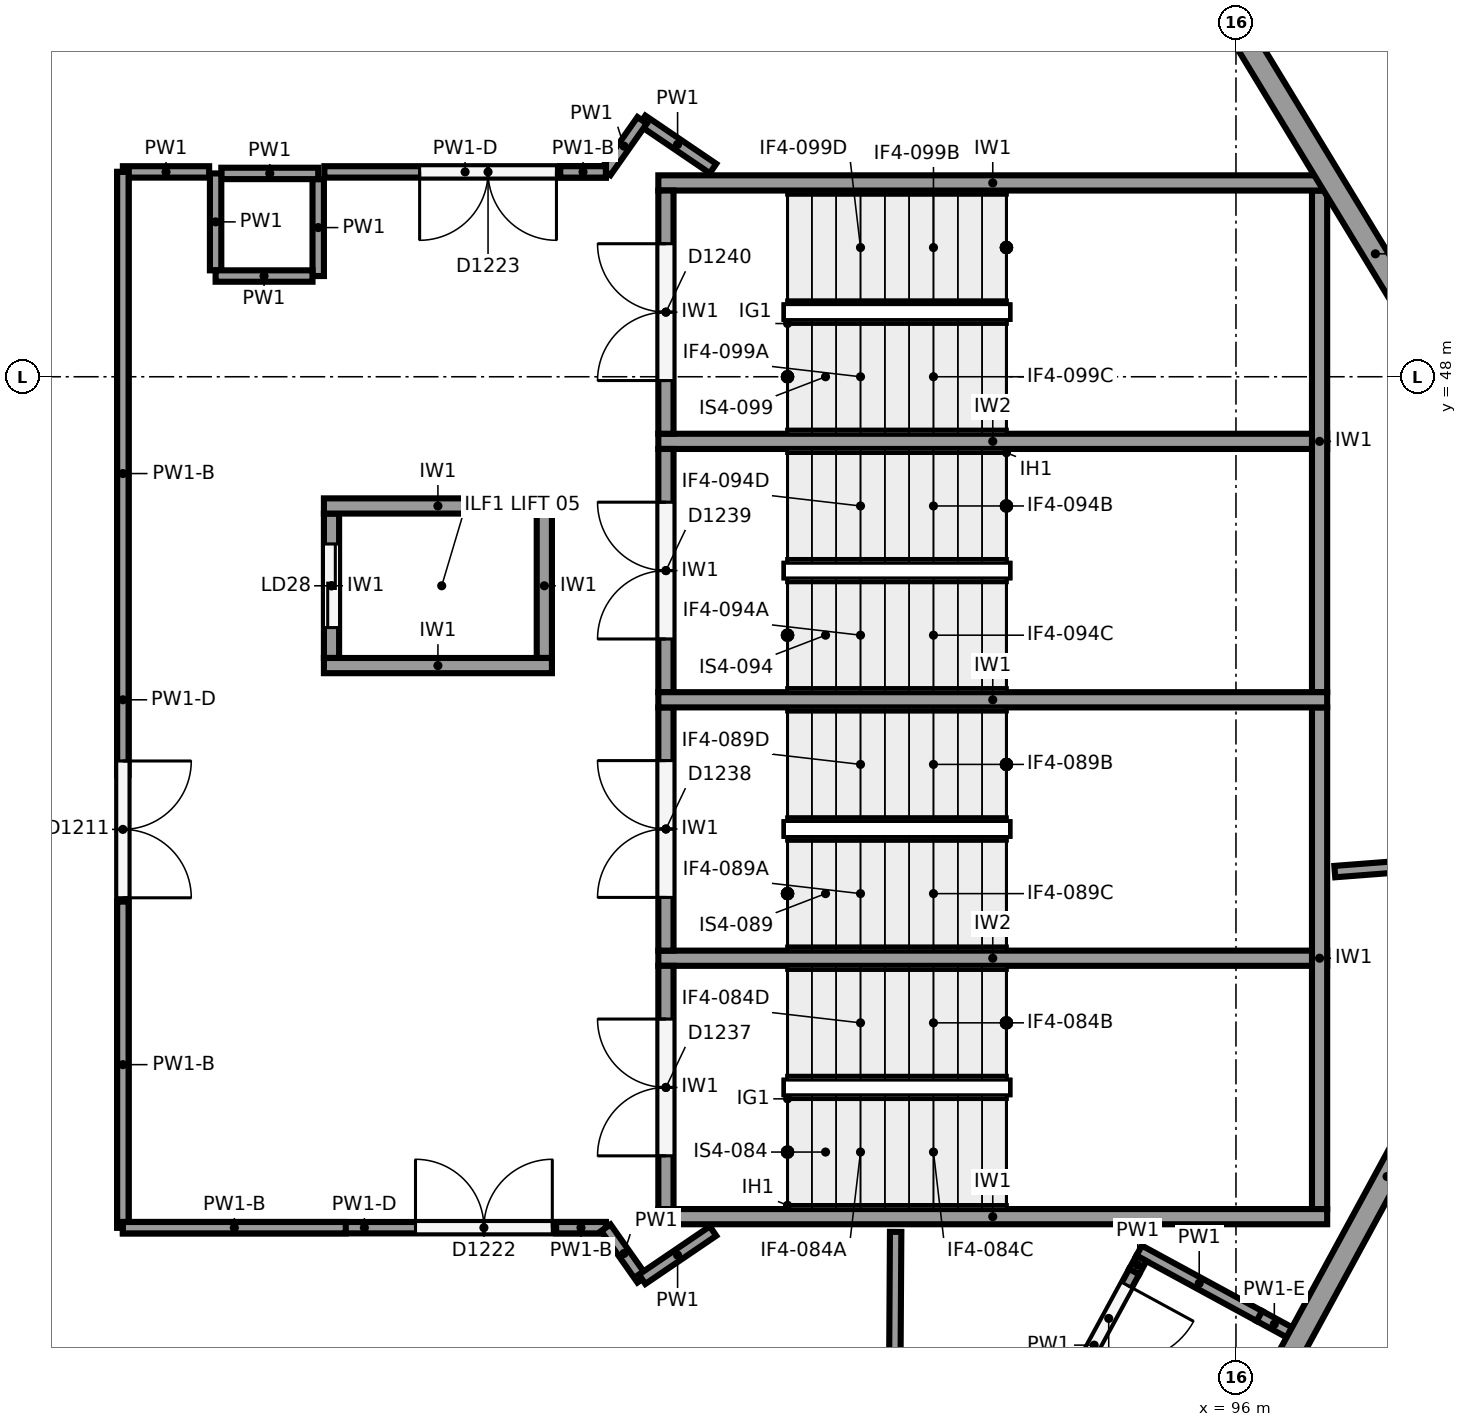
"""IFC4 building model, lengths in metres.
Left out: names, types, materials, properties, quantities, classifications, styles, units other than length and angle.
Written with IfcOpenShell. Run it as: python <this file> out.ifc"""

import sys

from ifc_helpers import new_model, si_unit, direction, frame, frame_2d, origin, origin_2d, place, context, subcontext, project, spatial, rectangle, circle, extrude, element, fill, save


model = new_model("IFC4")
c1 = context("Model", 3, precision=1e-05, world=origin(), true_north=direction((0.0, 1.0)))
c2 = subcontext(c1, "Body", "Model", "MODEL_VIEW")
j1 = project(units=[si_unit("LENGTHUNIT", "METRE"), si_unit("PLANEANGLEUNIT", "RADIAN")], contexts=[c1])
p1 = place(None, origin())
s1 = spatial("IfcSite", under=j1, at=p1, CompositionType="ELEMENT")
p2 = place(p1, origin())
s2 = spatial("IfcBuilding", under=s1, at=p2, CompositionType="ELEMENT")
p3 = place(p2, frame((0.0, 0.0, 12.0)))
s3 = spatial("IfcBuildingStorey", under=s2, at=p3, CompositionType="ELEMENT", Elevation=12.0)
p4 = place(p3, frame((84.884, 42.562, 0.0), z_axis=(0.0, 0.0, 1.0), x_axis=(1.0, 0.0, 0.0)))
e1 = element("IfcColumn", 1, at=p4, inside=s3, PredefinedType="COLUMN", context=c2, shape_type="SweptSolid", body=[
    extrude(circle(Radius=0.6, at=origin_2d()), origin(), (0.0, 0.0, 1.0), 6.0),
])
p5 = place(p3, frame((101.161, 43.311, 0.0), z_axis=(0.0, 0.0, 1.0), x_axis=(-0.477867771117, -0.878431780691, 0.0)))
e2 = element("IfcWall", 2, at=p5, inside=s3, PredefinedType="SOLIDWALL", context=c2, shape_type="SweptSolid", body=[
    extrude(rectangle(XDim=13.28, YDim=0.3, at=frame_2d((6.64, 0.0))), origin(), (0.0, 0.0, 1.0), 4.35),
])
p6 = place(p5, frame((9.53, 0.0, 0.0)))
e3 = element("IfcOpeningElement", 3, at=p6, cuts=e2, PredefinedType="OPENING", context=c2, shape_type="SweptSolid", body=[
    extrude(rectangle(XDim=1.8, YDim=2.4, at=frame_2d((0.9, 1.2))), frame((0.0, 0.16, 0.0), z_axis=(0.0, -1.0, 0.0), x_axis=(1.0, 0.0, 0.0)), (0.0, 0.0, 1.0), 0.32),
])
p7 = place(p3, frame((94.528, 55.057, 0.0), z_axis=(0.0, 0.0, 1.0), x_axis=(0.519362860044, -0.854553813172, 0.0)))
e4 = element("IfcWall", 4, at=p7, inside=s3, PredefinedType="SOLIDWALL", context=c2, shape_type="SweptSolid", body=[
    extrude(rectangle(XDim=12.732, YDim=0.3, at=frame_2d((6.366, 0.0))), origin(), (0.0, 0.0, 1.0), 4.35),
])
for number, where, z_axis, x_axis in (
    (5, (97.2, 36.95, 0.0), (0.0, 0.0, 1.0), (-1.0, 0.0, 0.0)),
    (6, (97.2, 43.75, 0.0), (0.0, 0.0, 1.0), (-1.0, 0.0, 0.0)),
    (7, (97.2, 50.55, 0.0), (0.0, 0.0, 1.0), (-1.0, 0.0, 0.0)),
):
    element("IfcWall", number, at=place(p3, frame(where, z_axis=z_axis, x_axis=x_axis)), inside=s3, PredefinedType="SHEAR", context=c2, shape_type="SweptSolid", body=[
        extrude(rectangle(XDim=8.8, YDim=0.2, at=frame_2d((4.4, 0.0))), origin(), (0.0, 0.0, 1.0), 5.65),
    ])
for number, where, z_axis, x_axis in (
    (8, (97.1, 37.05, 0.0), (0.0, 0.0, 1.0), (0.0, 1.0, 0.0)),
    (9, (97.1, 43.85, 0.0), (0.0, 0.0, 1.0), (0.0, 1.0, 0.0)),
):
    element("IfcWall", number, at=place(p3, frame(where, z_axis=z_axis, x_axis=x_axis)), inside=s3, PredefinedType="SHEAR", context=c2, shape_type="SweptSolid", body=[
        extrude(rectangle(XDim=6.6, YDim=0.2, at=frame_2d((3.3, 0.0))), origin(), (0.0, 0.0, 1.0), 5.65),
    ])
for number, where, z_axis, x_axis in (
    (10, (97.2, 40.35, 0.0), (0.0, 0.0, 1.0), (-1.0, 0.0, 0.0)),
    (11, (97.2, 47.15, 0.0), (0.0, 0.0, 1.0), (-1.0, 0.0, 0.0)),
):
    element("IfcWall", number, at=place(p3, frame(where, z_axis=z_axis, x_axis=x_axis)), inside=s3, PredefinedType="SHEAR", context=c2, shape_type="SweptSolid", body=[
        extrude(rectangle(XDim=8.8, YDim=0.2, at=frame_2d((4.4, 0.0))), origin(), (0.0, 0.0, 1.0), 5.65),
    ])
p8 = place(p3, frame((88.5, 37.05, 0.0), z_axis=(0.0, 0.0, 1.0), x_axis=(0.0, 1.0, 0.0)))
e12 = element("IfcWall", 12, at=p8, inside=s3, PredefinedType="SHEAR", context=c2, shape_type="SweptSolid", body=[
    extrude(rectangle(XDim=3.2, YDim=0.2, at=frame_2d((1.6, 0.0))), origin(), (0.0, 0.0, 1.0), 5.65),
])
p9 = place(p8, frame((0.7, 0.0, 0.0)))
e13 = element("IfcOpeningElement", 13, at=p9, cuts=e12, PredefinedType="OPENING", context=c2, shape_type="SweptSolid", body=[
    extrude(rectangle(XDim=1.8, YDim=2.1, at=frame_2d((0.9, 1.05))), frame((0.0, 0.11, 0.0), z_axis=(0.0, -1.0, 0.0), x_axis=(1.0, 0.0, 0.0)), (0.0, 0.0, 1.0), 0.22),
])
p10 = place(p3, frame((88.5, 40.45, 0.0), z_axis=(0.0, 0.0, 1.0), x_axis=(0.0, 1.0, 0.0)))
e14 = element("IfcWall", 14, at=p10, inside=s3, PredefinedType="SHEAR", context=c2, shape_type="SweptSolid", body=[
    extrude(rectangle(XDim=3.2, YDim=0.2, at=frame_2d((1.6, 0.0))), origin(), (0.0, 0.0, 1.0), 5.65),
])
p11 = place(p10, frame((0.7, 0.0, 0.0)))
e15 = element("IfcOpeningElement", 15, at=p11, cuts=e14, PredefinedType="OPENING", context=c2, shape_type="SweptSolid", body=[
    extrude(rectangle(XDim=1.8, YDim=2.1, at=frame_2d((0.9, 1.05))), frame((0.0, 0.11, 0.0), z_axis=(0.0, -1.0, 0.0), x_axis=(1.0, 0.0, 0.0)), (0.0, 0.0, 1.0), 0.22),
])
p12 = place(p3, frame((88.5, 43.85, 0.0), z_axis=(0.0, 0.0, 1.0), x_axis=(0.0, 1.0, 0.0)))
e16 = element("IfcWall", 16, at=p12, inside=s3, PredefinedType="SHEAR", context=c2, shape_type="SweptSolid", body=[
    extrude(rectangle(XDim=3.2, YDim=0.2, at=frame_2d((1.6, 0.0))), origin(), (0.0, 0.0, 1.0), 5.65),
])
p13 = place(p12, frame((0.7, 0.0, 0.0)))
e17 = element("IfcOpeningElement", 17, at=p13, cuts=e16, PredefinedType="OPENING", context=c2, shape_type="SweptSolid", body=[
    extrude(rectangle(XDim=1.8, YDim=2.1, at=frame_2d((0.9, 1.05))), frame((0.0, 0.11, 0.0), z_axis=(0.0, -1.0, 0.0), x_axis=(1.0, 0.0, 0.0)), (0.0, 0.0, 1.0), 0.22),
])
p14 = place(p3, frame((88.5, 47.25, 0.0), z_axis=(0.0, 0.0, 1.0), x_axis=(0.0, 1.0, 0.0)))
e18 = element("IfcWall", 18, at=p14, inside=s3, PredefinedType="SHEAR", context=c2, shape_type="SweptSolid", body=[
    extrude(rectangle(XDim=3.2, YDim=0.2, at=frame_2d((1.6, 0.0))), origin(), (0.0, 0.0, 1.0), 5.65),
])
p15 = place(p14, frame((0.7, 0.0, 0.0)))
e19 = element("IfcOpeningElement", 19, at=p15, cuts=e18, PredefinedType="OPENING", context=c2, shape_type="SweptSolid", body=[
    extrude(rectangle(XDim=1.8, YDim=2.1, at=frame_2d((0.9, 1.05))), frame((0.0, 0.11, 0.0), z_axis=(0.0, -1.0, 0.0), x_axis=(1.0, 0.0, 0.0)), (0.0, 0.0, 1.0), 0.22),
])
for number, where, z_axis, x_axis in (
    (20, (87.0, 44.2, 0.0), (0.0, 0.0, 1.0), (-1.0, 0.0, 0.0)),
    (21, (87.0, 46.3, 0.0), (0.0, 0.0, 1.0), (-1.0, 0.0, 0.0)),
):
    element("IfcWall", number, at=place(p3, frame(where, z_axis=z_axis, x_axis=x_axis)), inside=s3, PredefinedType="SHEAR", context=c2, shape_type="SweptSolid", body=[
        extrude(rectangle(XDim=3.0, YDim=0.2, at=frame_2d((1.5, 0.0))), origin(), (0.0, 0.0, 1.0), 5.65),
    ])
p16 = place(p3, frame((86.9, 44.3, 0.0), z_axis=(0.0, 0.0, 1.0), x_axis=(0.0, 1.0, 0.0)))
e22 = element("IfcWall", 22, at=p16, inside=s3, PredefinedType="SHEAR", context=c2, shape_type="SweptSolid", body=[
    extrude(rectangle(XDim=1.9, YDim=0.2, at=frame_2d((0.95, 0.0))), origin(), (0.0, 0.0, 1.0), 5.65),
])
p17 = place(p3, frame((84.1, 44.3, 0.0), z_axis=(0.0, 0.0, 1.0), x_axis=(0.0, 1.0, 0.0)))
e23 = element("IfcWall", 23, at=p17, inside=s3, PredefinedType="SHEAR", context=c2, shape_type="SweptSolid", body=[
    extrude(rectangle(XDim=1.9, YDim=0.2, at=frame_2d((0.95, 0.0))), origin(), (0.0, 0.0, 1.0), 5.65),
])
p18 = place(p17, frame((0.4, 0.0, 0.0)))
e24 = element("IfcOpeningElement", 24, at=p18, cuts=e23, PredefinedType="OPENING", context=c2, shape_type="SweptSolid", body=[
    extrude(rectangle(XDim=1.1, YDim=2.1, at=frame_2d((0.55, 1.05))), frame((0.0, 0.11, 0.0), z_axis=(0.0, -1.0, 0.0), x_axis=(1.0, 0.0, 0.0)), (0.0, 0.0, 1.0), 0.22),
])
p19 = place(p3, frame((91.49, 31.489, 0.0), z_axis=(0.0, 0.0, 1.0), x_axis=(0.006125459352, 0.999981239198, 0.0)))
e25 = element("IfcWall", 25, at=p19, inside=s3, PredefinedType="PARTITIONING", context=c2, shape_type="SweptSolid", body=[
    extrude(rectangle(XDim=5.261, YDim=0.15, at=frame_2d((2.63, 0.0))), origin(), (0.0, 0.0, 1.0), 5.65),
])
p20 = place(p3, frame((97.3, 41.49, 0.0), z_axis=(0.0, 0.0, 1.0), x_axis=(0.99706720675, 0.076530942913, 0.0)))
e26 = element("IfcWall", 26, at=p20, inside=s3, PredefinedType="PARTITIONING", context=c2, shape_type="SweptSolid", body=[
    extrude(rectangle(XDim=2.255, YDim=0.15, at=frame_2d((1.128, 0.0))), origin(), (0.0, 0.0, 1.0), 5.65),
])
for number, where, z_axis, x_axis in (
    (27, (83.925, 49.325, 0.0), (0.0, 0.0, 1.0), (0.0, 1.0, 0.0)),
    (28, (83.925, 50.675, 0.0), (0.0, 0.0, 1.0), (-1.0, 0.0, 0.0)),
    (29, (82.575, 50.675, 0.0), (0.0, 0.0, 1.0), (0.0, -1.0, 0.0)),
    (30, (82.575, 49.325, 0.0), (0.0, 0.0, 1.0), (1.0, 0.0, 0.0)),
):
    element("IfcWall", number, at=place(p3, frame(where, z_axis=z_axis, x_axis=x_axis)), inside=s3, PredefinedType="PARTITIONING", context=c2, shape_type="SweptSolid", body=[
        extrude(rectangle(XDim=1.275, YDim=0.15, at=frame_2d((0.638, 0.0))), origin(), (0.0, 0.0, 1.0), 5.65),
    ])
p21 = place(p3, frame((82.49, 50.695, 0.0), z_axis=(0.0, 0.0, 1.0), x_axis=(-1.0, 0.0, 0.0)))
e31 = element("IfcWall", 31, at=p21, inside=s3, PredefinedType="PARTITIONING", context=c2, shape_type="SweptSolid", body=[
    extrude(rectangle(XDim=1.135, YDim=0.15, at=frame_2d((0.567, 0.0))), origin(), (0.0, 0.0, 1.0), 5.65),
])
p22 = place(p3, frame((81.355, 50.695, 0.0), z_axis=(0.0, 0.0, 1.0), x_axis=(0.0, -1.0, 0.0)))
e32 = element("IfcWall", 32, at=p22, inside=s3, PredefinedType="PARTITIONING", context=c2, shape_type="SweptSolid", body=[
    extrude(rectangle(XDim=13.89, YDim=0.15, at=frame_2d((6.945, 0.0))), origin(), (0.0, 0.0, 1.0), 4.55),
])
p23 = place(p22, frame((7.75, 0.0, 0.0)))
e33 = element("IfcOpeningElement", 33, at=p23, cuts=e32, PredefinedType="OPENING", context=c2, shape_type="SweptSolid", body=[
    extrude(rectangle(XDim=1.8, YDim=2.1, at=frame_2d((0.9, 1.05))), frame((0.0, 0.085, 0.0), z_axis=(0.0, -1.0, 0.0), x_axis=(1.0, 0.0, 0.0)), (0.0, 0.0, 1.0), 0.17),
])
p24 = place(p3, frame((81.355, 50.695, 4.55), z_axis=(0.0, 0.0, 1.0), x_axis=(0.0, -1.0, 0.0)))
e34 = element("IfcWall", 34, at=p24, inside=s3, PredefinedType="PARTITIONING", context=c2, shape_type="SweptSolid", body=[
    extrude(rectangle(XDim=7.937, YDim=0.15, at=frame_2d((3.969, 0.0))), origin(), (0.0, 0.0, 1.0), 1.1),
])
p25 = place(p3, frame((81.355, 41.095, 4.55), z_axis=(0.0, 0.0, 1.0), x_axis=(0.0, -1.0, 0.0)))
e35 = element("IfcWall", 35, at=p25, inside=s3, PredefinedType="PARTITIONING", context=c2, shape_type="SweptSolid", body=[
    extrude(rectangle(XDim=4.29, YDim=0.15, at=frame_2d((2.145, 0.0))), origin(), (0.0, 0.0, 1.0), 1.1),
])
p26 = place(p3, frame((81.355, 36.805, 0.0), z_axis=(0.0, 0.0, 1.0), x_axis=(1.0, 0.0, 0.0)))
e36 = element("IfcWall", 36, at=p26, inside=s3, PredefinedType="PARTITIONING", context=c2, shape_type="SweptSolid", body=[
    extrude(rectangle(XDim=6.354, YDim=0.15, at=frame_2d((3.177, 0.0))), origin(), (0.0, 0.0, 1.0), 4.55),
])
p27 = place(p26, frame((3.85, 0.0, 0.0)))
e37 = element("IfcOpeningElement", 37, at=p27, cuts=e36, PredefinedType="OPENING", context=c2, shape_type="SweptSolid", body=[
    extrude(rectangle(XDim=1.8, YDim=2.1, at=frame_2d((0.9, 1.05))), frame((0.0, 0.085, 0.0), z_axis=(0.0, -1.0, 0.0), x_axis=(1.0, 0.0, 0.0)), (0.0, 0.0, 1.0), 0.17),
])
p28 = place(p3, frame((81.355, 36.805, 4.55), z_axis=(0.0, 0.0, 1.0), x_axis=(1.0, 0.0, 0.0)))
e38 = element("IfcWall", 38, at=p28, inside=s3, PredefinedType="PARTITIONING", context=c2, shape_type="SweptSolid", body=[
    extrude(rectangle(XDim=2.933, YDim=0.15, at=frame_2d((1.466, 0.0))), origin(), (0.0, 0.0, 1.0), 1.1),
])
p29 = place(p3, frame((87.055, 36.805, 4.55), z_axis=(0.0, 0.0, 1.0), x_axis=(1.0, 0.0, 0.0)))
e39 = element("IfcWall", 39, at=p29, inside=s3, PredefinedType="PARTITIONING", context=c2, shape_type="SweptSolid", body=[
    extrude(rectangle(XDim=0.654, YDim=0.15, at=frame_2d((0.327, 0.0))), origin(), (0.0, 0.0, 1.0), 1.1),
])
p30 = place(p3, frame((87.709, 36.805, 0.0), z_axis=(0.0, 0.0, 1.0), x_axis=(0.575573582652, -0.81774999294, 0.0)))
e40 = element("IfcWall", 40, at=p30, inside=s3, PredefinedType="PARTITIONING", context=c2, shape_type="SweptSolid", body=[
    extrude(rectangle(XDim=0.83, YDim=0.15, at=frame_2d((0.415, 0.0))), origin(), (0.0, 0.0, 1.0), 5.65),
])
for number, where, z_axis, x_axis in (
    (41, (88.187, 36.126, 0.0), (0.0, 0.0, 1.0), (0.827, 0.562, 0.0)),
    (42, (89.12, 50.74, 0.0), (0.0, 0.0, 1.0), (-0.827, 0.562, 0.0)),
):
    element("IfcWall", number, at=place(p3, frame(where, z_axis=z_axis, x_axis=x_axis)), inside=s3, PredefinedType="PARTITIONING", context=c2, shape_type="SweptSolid", body=[
        extrude(rectangle(XDim=1.128, YDim=0.15, at=frame_2d((0.564, 0.0))), origin(), (0.0, 0.0, 1.0), 5.65),
    ])
p31 = place(p3, frame((88.187, 51.374, 0.0), z_axis=(0.0, 0.0, 1.0), x_axis=(-0.575376756214, -0.817888493872, 0.0)))
e43 = element("IfcWall", 43, at=p31, inside=s3, PredefinedType="PARTITIONING", context=c2, shape_type="SweptSolid", body=[
    extrude(rectangle(XDim=0.83, YDim=0.15, at=frame_2d((0.415, 0.0))), origin(), (0.0, 0.0, 1.0), 5.65),
])
p32 = place(p3, frame((87.709, 50.695, 0.0), z_axis=(0.0, 0.0, 1.0), x_axis=(-1.0, 0.0, 0.0)))
e44 = element("IfcWall", 44, at=p32, inside=s3, PredefinedType="PARTITIONING", context=c2, shape_type="SweptSolid", body=[
    extrude(rectangle(XDim=3.704, YDim=0.15, at=frame_2d((1.852, 0.0))), origin(), (0.0, 0.0, 1.0), 4.55),
])
p33 = place(p32, frame((0.65, 0.0, 0.0)))
e45 = element("IfcOpeningElement", 45, at=p33, cuts=e44, PredefinedType="OPENING", context=c2, shape_type="SweptSolid", body=[
    extrude(rectangle(XDim=1.8, YDim=2.1, at=frame_2d((0.9, 1.05))), frame((0.0, 0.085, 0.0), z_axis=(0.0, -1.0, 0.0), x_axis=(1.0, 0.0, 0.0)), (0.0, 0.0, 1.0), 0.17),
])
p34 = place(p3, frame((87.709, 50.695, 4.55), z_axis=(0.0, 0.0, 1.0), x_axis=(-1.0, 0.0, 0.0)))
e46 = element("IfcWall", 46, at=p34, inside=s3, PredefinedType="PARTITIONING", context=c2, shape_type="SweptSolid", body=[
    extrude(rectangle(XDim=0.6, YDim=0.15, at=frame_2d((0.3, 0.0))), origin(), (0.0, 0.0, 1.0), 1.1),
])
p35 = place(p3, frame((96.702, 35.428, 0.0), z_axis=(0.0, 0.0, 1.0), x_axis=(-0.878372019733, 0.477977609256, 0.0)))
e47 = element("IfcWall", 47, at=p35, inside=s3, PredefinedType="PARTITIONING", context=c2, shape_type="SweptSolid", body=[
    extrude(rectangle(XDim=0.45, YDim=0.15, at=frame_2d((0.225, 0.0))), origin(), (0.0, 0.0, 1.0), 4.35),
])
p36 = place(p3, frame((96.307, 35.643, 0.0), z_axis=(0.0, 0.0, 1.0), x_axis=(-0.878428962466, 0.477872951632, 0.0)))
e48 = element("IfcWall", 48, at=p36, inside=s3, PredefinedType="PARTITIONING", context=c2, shape_type="SweptSolid", body=[
    extrude(rectangle(XDim=1.8, YDim=0.15, at=frame_2d((0.9, 0.0))), origin(), (0.0, 0.0, 1.0), 5.65),
])
p37 = place(p3, frame((94.756, 36.402, 0.0), z_axis=(0.0, 0.0, 1.0), x_axis=(-0.478168266369, -0.878268244352, 0.0)))
e49 = element("IfcWall", 49, at=p37, inside=s3, PredefinedType="PARTITIONING", context=c2, shape_type="SweptSolid", body=[
    extrude(rectangle(XDim=0.2, YDim=0.15, at=frame_2d((0.1, 0.0))), origin(), (0.0, 0.0, 1.0), 5.65),
])
p38 = place(p3, frame((94.66, 36.226, 0.0), z_axis=(0.0, 0.0, 1.0), x_axis=(-0.477887643273, -0.878420969927, 0.0)))
e50 = element("IfcWall", 50, at=p38, inside=s3, PredefinedType="PARTITIONING", context=c2, shape_type="SweptSolid", body=[
    extrude(rectangle(XDim=2.2, YDim=0.15, at=frame_2d((1.1, 0.0))), origin(), (0.0, 0.0, 1.0), 5.65),
])
p39 = place(p38, frame((0.2, 0.0, 0.0)))
e51 = element("IfcOpeningElement", 51, at=p39, cuts=e50, PredefinedType="OPENING", context=c2, shape_type="SweptSolid", body=[
    extrude(rectangle(XDim=1.0, YDim=2.1, at=frame_2d((0.5, 1.05))), frame((0.0, 0.085, 0.0), z_axis=(0.0, -1.0, 0.0), x_axis=(1.0, 0.0, 0.0)), (0.0, 0.0, 1.0), 0.17),
])
p40 = place(p9, origin())
e52 = element("IfcDoor", 52, at=p40, inside=s3, OperationType="DOUBLE_DOOR_SINGLE_SWING", PredefinedType="DOOR", context=c2, shape_type="SweptSolid", body=[
    extrude(rectangle(XDim=1.8, YDim=2.1, at=frame_2d((0.9, 1.05))), frame((0.0, 0.025, 0.0), z_axis=(0.0, -1.0, 0.0), x_axis=(1.0, 0.0, 0.0)), (0.0, 0.0, 1.0), 0.05),
])
fill(e13, e52)
p41 = place(p11, origin())
e53 = element("IfcDoor", 53, at=p41, inside=s3, OperationType="DOUBLE_DOOR_SINGLE_SWING", PredefinedType="DOOR", context=c2, shape_type="SweptSolid", body=[
    extrude(rectangle(XDim=1.8, YDim=2.1, at=frame_2d((0.9, 1.05))), frame((0.0, 0.025, 0.0), z_axis=(0.0, -1.0, 0.0), x_axis=(1.0, 0.0, 0.0)), (0.0, 0.0, 1.0), 0.05),
])
fill(e15, e53)
p42 = place(p13, origin())
e54 = element("IfcDoor", 54, at=p42, inside=s3, OperationType="DOUBLE_DOOR_SINGLE_SWING", PredefinedType="DOOR", context=c2, shape_type="SweptSolid", body=[
    extrude(rectangle(XDim=1.8, YDim=2.1, at=frame_2d((0.9, 1.05))), frame((0.0, 0.025, 0.0), z_axis=(0.0, -1.0, 0.0), x_axis=(1.0, 0.0, 0.0)), (0.0, 0.0, 1.0), 0.05),
])
fill(e17, e54)
p43 = place(p15, origin())
e55 = element("IfcDoor", 55, at=p43, inside=s3, OperationType="DOUBLE_DOOR_SINGLE_SWING", PredefinedType="DOOR", context=c2, shape_type="SweptSolid", body=[
    extrude(rectangle(XDim=1.8, YDim=2.1, at=frame_2d((0.9, 1.05))), frame((0.0, 0.025, 0.0), z_axis=(0.0, -1.0, 0.0), x_axis=(1.0, 0.0, 0.0)), (0.0, 0.0, 1.0), 0.05),
])
fill(e19, e55)
p44 = place(p18, origin())
e56 = element("IfcDoor", 56, at=p44, inside=s3, OperationType="SLIDING_TO_RIGHT", PredefinedType="DOOR", context=c2, shape_type="SweptSolid", body=[
    extrude(rectangle(XDim=1.1, YDim=2.1, at=frame_2d((0.55, 1.05))), frame((0.0, 0.025, 0.0), z_axis=(0.0, -1.0, 0.0), x_axis=(1.0, 0.0, 0.0)), (0.0, 0.0, 1.0), 0.05),
])
fill(e24, e56)
p45 = place(p23, origin())
e57 = element("IfcDoor", 57, at=p45, inside=s3, OperationType="DOUBLE_DOOR_SINGLE_SWING", PredefinedType="DOOR", context=c2, shape_type="SweptSolid", body=[
    extrude(rectangle(XDim=1.8, YDim=2.1, at=frame_2d((0.9, 1.05))), frame((0.0, 0.025, 0.0), z_axis=(0.0, -1.0, 0.0), x_axis=(1.0, 0.0, 0.0)), (0.0, 0.0, 1.0), 0.05),
])
fill(e33, e57)
p46 = place(p33, origin())
e58 = element("IfcDoor", 58, at=p46, inside=s3, OperationType="DOUBLE_DOOR_SINGLE_SWING", PredefinedType="DOOR", context=c2, shape_type="SweptSolid", body=[
    extrude(rectangle(XDim=1.8, YDim=2.1, at=frame_2d((0.9, 1.05))), frame((0.0, 0.025, 0.0), z_axis=(0.0, -1.0, 0.0), x_axis=(1.0, 0.0, 0.0)), (0.0, 0.0, 1.0), 0.05),
])
fill(e45, e58)
p47 = place(p27, origin())
e59 = element("IfcDoor", 59, at=p47, inside=s3, OperationType="DOUBLE_DOOR_SINGLE_SWING", PredefinedType="DOOR", context=c2, shape_type="SweptSolid", body=[
    extrude(rectangle(XDim=1.8, YDim=2.1, at=frame_2d((0.9, 1.05))), frame((0.0, 0.025, 0.0), z_axis=(0.0, -1.0, 0.0), x_axis=(1.0, 0.0, 0.0)), (0.0, 0.0, 1.0), 0.05),
])
fill(e37, e59)
p48 = place(p39, origin())
e60 = element("IfcDoor", 60, at=p48, inside=s3, OperationType="SINGLE_SWING_LEFT", PredefinedType="DOOR", context=c2, shape_type="SweptSolid", body=[
    extrude(rectangle(XDim=1.0, YDim=2.1, at=frame_2d((0.5, 1.05))), frame((0.0, 0.025, 0.0), z_axis=(0.0, -1.0, 0.0), x_axis=(1.0, 0.0, 0.0)), (0.0, 0.0, 1.0), 0.05),
])
fill(e51, e60)
save(model, sys.argv[1])
